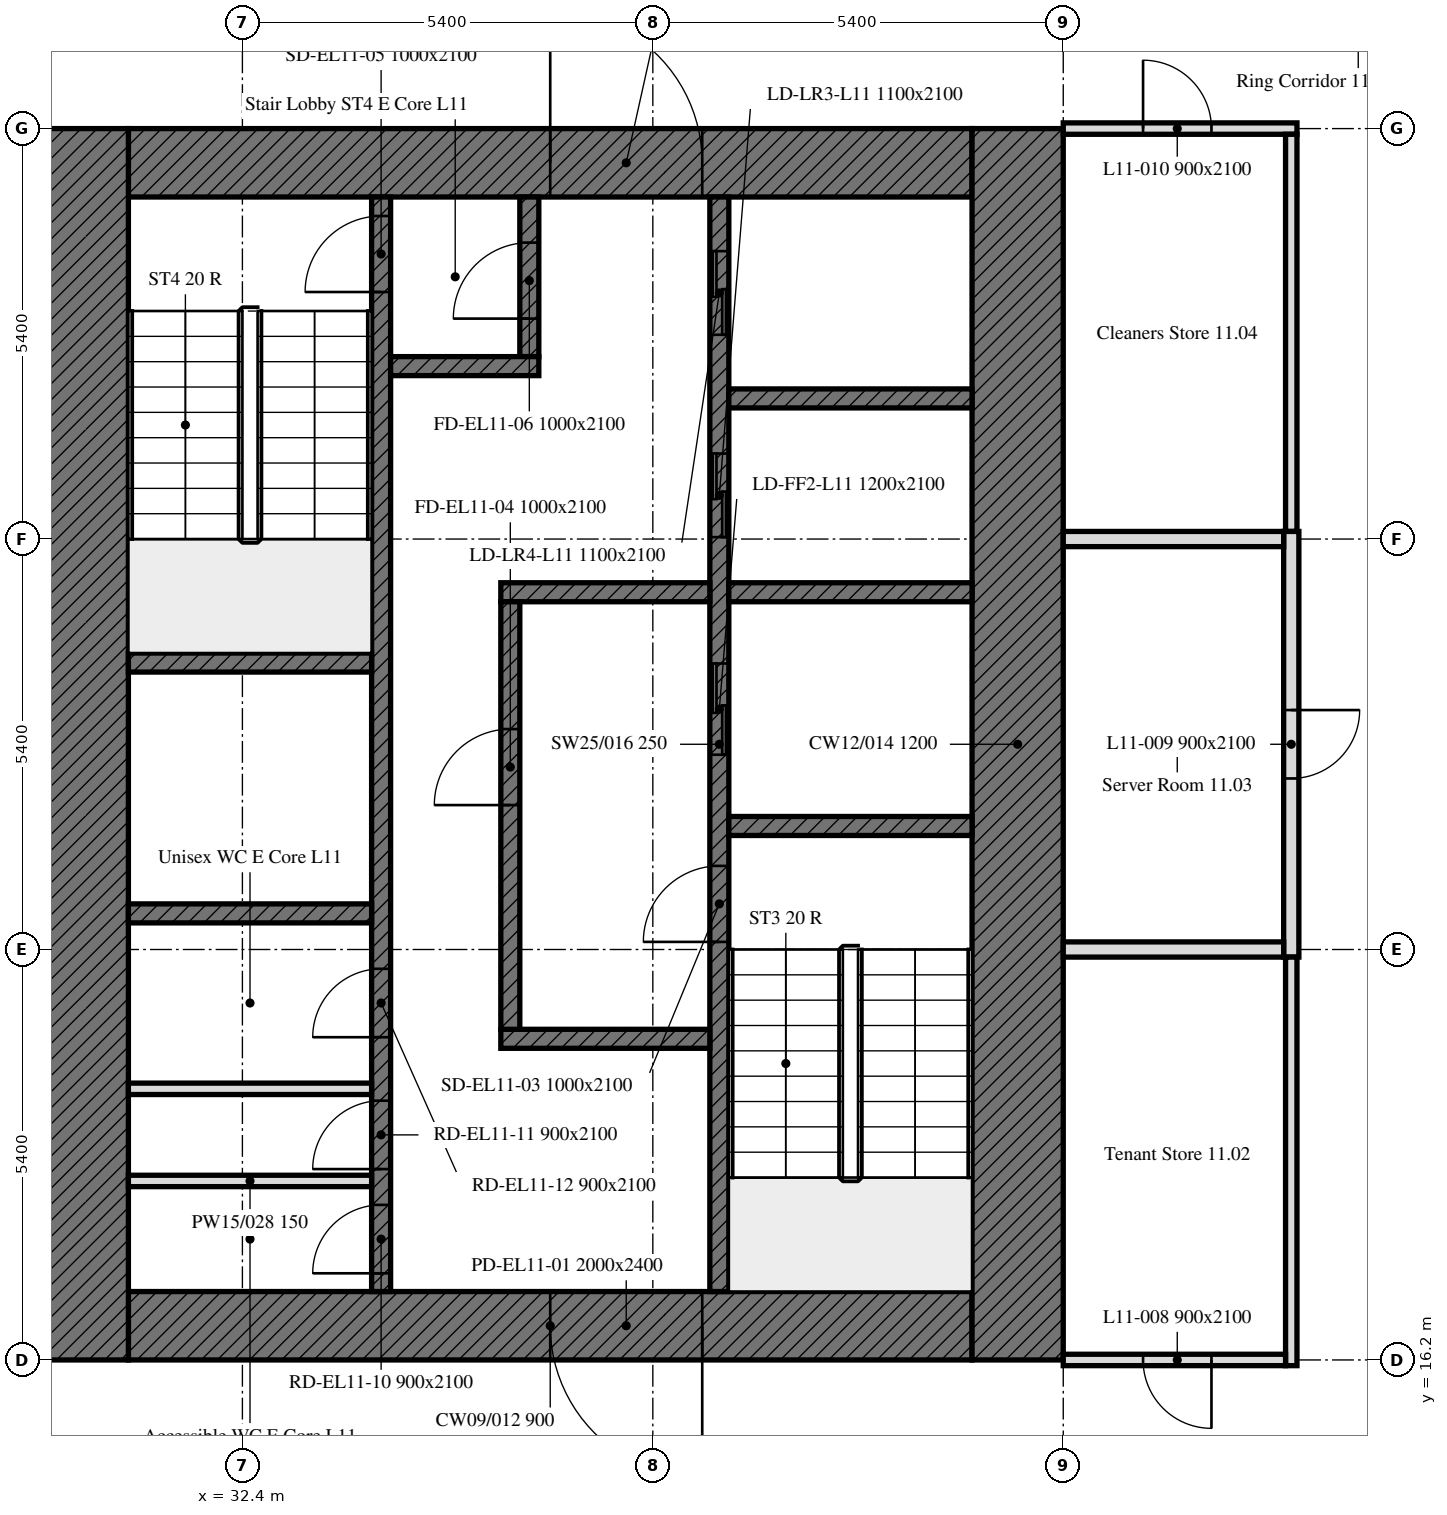
"""IFC4 building model, lengths in metres.
Left out: names, types, materials, properties, quantities, classifications, styles, units other than length and angle.
Written with IfcOpenShell. Run it as: python <this file> out.ifc"""

import sys

from ifc_helpers import new_model, si_unit, direction, frame, frame_2d, origin, place, context, subcontext, project, spatial, rectangle, extrude, element, fill, save


model = new_model("IFC4")
c1 = context("Model", 3, precision=1e-05, world=origin(), true_north=direction((0.0, 1.0)))
c2 = subcontext(c1, "Body", "Model", "MODEL_VIEW")
j1 = project(units=[si_unit("LENGTHUNIT", "METRE"), si_unit("PLANEANGLEUNIT", "RADIAN")], contexts=[c1])
p1 = place(None, origin())
s1 = spatial("IfcSite", under=j1, at=p1, CompositionType="ELEMENT")
p2 = place(p1, origin())
s2 = spatial("IfcBuilding", under=s1, at=p2, CompositionType="ELEMENT")
p3 = place(p2, frame((0.0, 0.0, 52.6)))
s3 = spatial("IfcBuildingStorey", under=s2, at=p3, CompositionType="ELEMENT", Elevation=52.6)
p4 = place(p3, frame((42.0, 16.65, 0.0), z_axis=(0.0, 0.0, 1.0), x_axis=(-1.0, 0.0, 0.0)))
e1 = element("IfcWall", 1, at=p4, inside=s3, PredefinedType="SOLIDWALL", context=c2, shape_type="SweptSolid", body=[
    extrude(rectangle(XDim=11.1, YDim=0.9, at=frame_2d((5.55, 0.0))), origin(), (0.0, 0.0, 1.0), 3.5),
])
p5 = place(p4, frame((3.55, 0.0, 0.0)))
e2 = element("IfcOpeningElement", 2, at=p5, cuts=e1, PredefinedType="OPENING", context=c2, shape_type="SweptSolid", body=[
    extrude(rectangle(XDim=2.0, YDim=2.4, at=frame_2d((1.0, 1.2))), frame((0.0, 0.45, 0.0), z_axis=(0.0, -1.0, 0.0), x_axis=(1.0, 0.0, 0.0)), (0.0, 0.0, 1.0), 0.9),
])
p6 = place(p3, frame((30.9, 31.95, 0.0), z_axis=(0.0, 0.0, 1.0), x_axis=(1.0, 0.0, 0.0)))
e3 = element("IfcWall", 3, at=p6, inside=s3, PredefinedType="SOLIDWALL", context=c2, shape_type="SweptSolid", body=[
    extrude(rectangle(XDim=11.1, YDim=0.9, at=frame_2d((5.55, 0.0))), origin(), (0.0, 0.0, 1.0), 3.5),
])
p7 = place(p6, frame((5.55, 0.0, 0.0)))
e4 = element("IfcOpeningElement", 4, at=p7, cuts=e3, PredefinedType="OPENING", context=c2, shape_type="SweptSolid", body=[
    extrude(rectangle(XDim=2.0, YDim=2.4, at=frame_2d((1.0, 1.2))), frame((0.0, 0.45, 0.0), z_axis=(0.0, -1.0, 0.0), x_axis=(1.0, 0.0, 0.0)), (0.0, 0.0, 1.0), 0.9),
])
for number, where, z_axis, x_axis in (
    (5, (42.6, 32.4, 0.0), (0.0, 0.0, 1.0), (0.0, -1.0, 0.0)),
    (6, (30.3, 16.2, 0.0), (0.0, 0.0, 1.0), (0.0, 1.0, 0.0)),
):
    element("IfcWall", number, at=place(p3, frame(where, z_axis=z_axis, x_axis=x_axis)), inside=s3, PredefinedType="SOLIDWALL", context=c2, shape_type="SweptSolid", body=[
        extrude(rectangle(XDim=16.2, YDim=1.2, at=frame_2d((8.1, 0.0))), origin(), (0.0, 0.0, 1.0), 3.5),
    ])
p8 = place(p3, frame((38.675, 17.1, 0.0), z_axis=(0.0, 0.0, 1.0), x_axis=(0.0, 1.0, 0.0)))
e7 = element("IfcWall", 7, at=p8, inside=s3, PredefinedType="SOLIDWALL", context=c2, shape_type="SweptSolid", body=[
    extrude(rectangle(XDim=14.4, YDim=0.25, at=frame_2d((7.2, 0.0))), origin(), (0.0, 0.0, 1.0), 3.5),
])
p9 = place(p8, frame((4.6, 0.0, 0.0)))
e8 = element("IfcOpeningElement", 8, at=p9, cuts=e7, PredefinedType="OPENING", context=c2, shape_type="SweptSolid", body=[
    extrude(rectangle(XDim=1.0, YDim=2.1, at=frame_2d((0.5, 1.05))), frame((0.0, 0.125, 0.0), z_axis=(0.0, -1.0, 0.0), x_axis=(1.0, 0.0, 0.0)), (0.0, 0.0, 1.0), 0.25),
])
p10 = place(p8, frame((7.062, 0.0, 0.0)))
e9 = element("IfcOpeningElement", 9, at=p10, cuts=e7, PredefinedType="OPENING", context=c2, shape_type="SweptSolid", body=[
    extrude(rectangle(XDim=1.2, YDim=2.1, at=frame_2d((0.6, 1.05))), frame((0.0, 0.125, 0.0), z_axis=(0.0, -1.0, 0.0), x_axis=(1.0, 0.0, 0.0)), (0.0, 0.0, 1.0), 0.25),
])
p11 = place(p8, frame((9.925, 0.0, 0.0)))
e10 = element("IfcOpeningElement", 10, at=p11, cuts=e7, PredefinedType="OPENING", context=c2, shape_type="SweptSolid", body=[
    extrude(rectangle(XDim=1.1, YDim=2.1, at=frame_2d((0.55, 1.05))), frame((0.0, 0.125, 0.0), z_axis=(0.0, -1.0, 0.0), x_axis=(1.0, 0.0, 0.0)), (0.0, 0.0, 1.0), 0.25),
])
p12 = place(p8, frame((12.587, 0.0, 0.0)))
e11 = element("IfcOpeningElement", 11, at=p12, cuts=e7, PredefinedType="OPENING", context=c2, shape_type="SweptSolid", body=[
    extrude(rectangle(XDim=1.1, YDim=2.1, at=frame_2d((0.55, 1.05))), frame((0.0, 0.125, 0.0), z_axis=(0.0, -1.0, 0.0), x_axis=(1.0, 0.0, 0.0)), (0.0, 0.0, 1.0), 0.25),
])
p13 = place(p3, frame((34.225, 17.1, 0.0), z_axis=(0.0, 0.0, 1.0), x_axis=(0.0, 1.0, 0.0)))
e12 = element("IfcWall", 12, at=p13, inside=s3, PredefinedType="SOLIDWALL", context=c2, shape_type="SweptSolid", body=[
    extrude(rectangle(XDim=14.4, YDim=0.25, at=frame_2d((7.2, 0.0))), origin(), (0.0, 0.0, 1.0), 3.5),
])
p14 = place(p13, frame((13.15, 0.0, 0.0)))
e13 = element("IfcOpeningElement", 13, at=p14, cuts=e12, PredefinedType="OPENING", context=c2, shape_type="SweptSolid", body=[
    extrude(rectangle(XDim=1.0, YDim=2.1, at=frame_2d((0.5, 1.05))), frame((0.0, 0.125, 0.0), z_axis=(0.0, -1.0, 0.0), x_axis=(1.0, 0.0, 0.0)), (0.0, 0.0, 1.0), 0.25),
])
p15 = place(p13, frame((0.24, 0.0, 0.0)))
e14 = element("IfcOpeningElement", 14, at=p15, cuts=e12, PredefinedType="OPENING", context=c2, shape_type="SweptSolid", body=[
    extrude(rectangle(XDim=0.9, YDim=2.1, at=frame_2d((0.45, 1.05))), frame((0.0, 0.125, 0.0), z_axis=(0.0, -1.0, 0.0), x_axis=(1.0, 0.0, 0.0)), (0.0, 0.0, 1.0), 0.25),
])
p16 = place(p13, frame((1.611, 0.0, 0.0)))
e15 = element("IfcOpeningElement", 15, at=p16, cuts=e12, PredefinedType="OPENING", context=c2, shape_type="SweptSolid", body=[
    extrude(rectangle(XDim=0.9, YDim=2.1, at=frame_2d((0.45, 1.05))), frame((0.0, 0.125, 0.0), z_axis=(0.0, -1.0, 0.0), x_axis=(1.0, 0.0, 0.0)), (0.0, 0.0, 1.0), 0.25),
])
p17 = place(p13, frame((3.346, 0.0, 0.0)))
e16 = element("IfcOpeningElement", 16, at=p17, cuts=e12, PredefinedType="OPENING", context=c2, shape_type="SweptSolid", body=[
    extrude(rectangle(XDim=0.9, YDim=2.1, at=frame_2d((0.45, 1.05))), frame((0.0, 0.125, 0.0), z_axis=(0.0, -1.0, 0.0), x_axis=(1.0, 0.0, 0.0)), (0.0, 0.0, 1.0), 0.25),
])
p18 = place(p3, frame((38.8, 23.225, 0.0), z_axis=(0.0, 0.0, 1.0), x_axis=(1.0, 0.0, 0.0)))
e17 = element("IfcWall", 17, at=p18, inside=s3, PredefinedType="SOLIDWALL", context=c2, shape_type="SweptSolid", body=[
    extrude(rectangle(XDim=3.2, YDim=0.25, at=frame_2d((1.6, 0.0))), origin(), (0.0, 0.0, 1.0), 3.5),
])
for number, where, z_axis, x_axis in (
    (18, (30.9, 25.375, 0.0), (0.0, 0.0, 1.0), (1.0, 0.0, 0.0)),
    (19, (30.9, 22.075, 0.0), (0.0, 0.0, 1.0), (1.0, 0.0, 0.0)),
):
    element("IfcWall", number, at=place(p3, frame(where, z_axis=z_axis, x_axis=x_axis)), inside=s3, PredefinedType="SOLIDWALL", context=c2, shape_type="SweptSolid", body=[
        extrude(rectangle(XDim=3.2, YDim=0.25, at=frame_2d((1.6, 0.0))), origin(), (0.0, 0.0, 1.0), 3.5),
    ])
p19 = place(p3, frame((38.8, 26.3, 0.0), z_axis=(0.0, 0.0, 1.0), x_axis=(1.0, 0.0, 0.0)))
e20 = element("IfcWall", 20, at=p19, inside=s3, PredefinedType="SOLIDWALL", context=c2, shape_type="SweptSolid", body=[
    extrude(rectangle(XDim=3.2, YDim=0.25, at=frame_2d((1.6, 0.0))), origin(), (0.0, 0.0, 1.0), 3.5),
])
for number, where, z_axis, x_axis in (
    (21, (35.8, 26.3, 0.0), (0.0, 0.0, 1.0), (1.0, 0.0, 0.0)),
    (22, (35.8, 20.425, 0.0), (0.0, 0.0, 1.0), (1.0, 0.0, 0.0)),
):
    element("IfcWall", number, at=place(p3, frame(where, z_axis=z_axis, x_axis=x_axis)), inside=s3, PredefinedType="SOLIDWALL", context=c2, shape_type="SweptSolid", body=[
        extrude(rectangle(XDim=2.75, YDim=0.25, at=frame_2d((1.375, 0.0))), origin(), (0.0, 0.0, 1.0), 3.5),
    ])
p20 = place(p3, frame((36.175, 29.4, 0.0), z_axis=(0.0, 0.0, 1.0), x_axis=(0.0, 1.0, 0.0)))
e23 = element("IfcWall", 23, at=p20, inside=s3, PredefinedType="SOLIDWALL", context=c2, shape_type="SweptSolid", body=[
    extrude(rectangle(XDim=2.1, YDim=0.25, at=frame_2d((1.05, 0.0))), origin(), (0.0, 0.0, 1.0), 3.5),
])
p21 = place(p20, frame((0.5, 0.0, 0.0)))
e24 = element("IfcOpeningElement", 24, at=p21, cuts=e23, PredefinedType="OPENING", context=c2, shape_type="SweptSolid", body=[
    extrude(rectangle(XDim=1.0, YDim=2.1, at=frame_2d((0.5, 1.05))), frame((0.0, 0.125, 0.0), z_axis=(0.0, -1.0, 0.0), x_axis=(1.0, 0.0, 0.0)), (0.0, 0.0, 1.0), 0.25),
])
p22 = place(p3, frame((34.35, 29.275, 0.0), z_axis=(0.0, 0.0, 1.0), x_axis=(1.0, 0.0, 0.0)))
e25 = element("IfcWall", 25, at=p22, inside=s3, PredefinedType="SOLIDWALL", context=c2, shape_type="SweptSolid", body=[
    extrude(rectangle(XDim=1.95, YDim=0.25, at=frame_2d((0.975, 0.0))), origin(), (0.0, 0.0, 1.0), 3.5),
])
p23 = place(p3, frame((35.925, 20.55, 0.0), z_axis=(0.0, 0.0, 1.0), x_axis=(0.0, 1.0, 0.0)))
e26 = element("IfcWall", 26, at=p23, inside=s3, PredefinedType="SOLIDWALL", context=c2, shape_type="SweptSolid", body=[
    extrude(rectangle(XDim=5.625, YDim=0.25, at=frame_2d((2.812, 0.0))), origin(), (0.0, 0.0, 1.0), 3.5),
])
p24 = place(p23, frame((2.95, 0.0, 0.0)))
e27 = element("IfcOpeningElement", 27, at=p24, cuts=e26, PredefinedType="OPENING", context=c2, shape_type="SweptSolid", body=[
    extrude(rectangle(XDim=1.0, YDim=2.1, at=frame_2d((0.5, 1.05))), frame((0.0, 0.125, 0.0), z_axis=(0.0, -1.0, 0.0), x_axis=(1.0, 0.0, 0.0)), (0.0, 0.0, 1.0), 0.25),
])
p25 = place(p3, frame((38.8, 28.85, 0.0), z_axis=(0.0, 0.0, 1.0), x_axis=(1.0, 0.0, 0.0)))
e28 = element("IfcWall", 28, at=p25, inside=s3, PredefinedType="SOLIDWALL", context=c2, shape_type="SweptSolid", body=[
    extrude(rectangle(XDim=3.2, YDim=0.25, at=frame_2d((1.6, 0.0))), origin(), (0.0, 0.0, 1.0), 3.5),
])
for number, where, z_axis, x_axis in (
    (29, (30.9, 18.555, 0.0), (0.0, 0.0, 1.0), (1.0, 0.0, 0.0)),
    (30, (30.9, 19.767, 0.0), (0.0, 0.0, 1.0), (1.0, 0.0, 0.0)),
):
    element("IfcWall", number, at=place(p3, frame(where, z_axis=z_axis, x_axis=x_axis)), inside=s3, PredefinedType="PARTITIONING", context=c2, shape_type="SweptSolid", body=[
        extrude(rectangle(XDim=3.2, YDim=0.15, at=frame_2d((1.6, 0.0))), origin(), (0.0, 0.0, 1.0), 3.5),
    ])
p26 = place(p3, frame((43.2, 32.4, 0.0), z_axis=(0.0, 0.0, 1.0), x_axis=(1.0, 0.0, 0.0)))
e31 = element("IfcWall", 31, at=p26, inside=s3, PredefinedType="PARTITIONING", context=c2, shape_type="SweptSolid", body=[
    extrude(rectangle(XDim=3.075, YDim=0.15, at=frame_2d((1.538, 0.0))), origin(), (0.0, 0.0, 1.0), 2.75),
])
p27 = place(p26, frame((1.05, 0.0, 0.0)))
e32 = element("IfcOpeningElement", 32, at=p27, cuts=e31, PredefinedType="OPENING", context=c2, shape_type="SweptSolid", body=[
    extrude(rectangle(XDim=0.9, YDim=2.1, at=frame_2d((0.45, 1.05))), frame((0.0, 0.075, 0.0), z_axis=(0.0, -1.0, 0.0), x_axis=(1.0, 0.0, 0.0)), (0.0, 0.0, 1.0), 0.15),
])
p28 = place(p3, frame((46.2, 32.325, 0.0), z_axis=(0.0, 0.0, 1.0), x_axis=(0.0, -1.0, 0.0)))
e33 = element("IfcWall", 33, at=p28, inside=s3, PredefinedType="PARTITIONING", context=c2, shape_type="SweptSolid", body=[
    extrude(rectangle(XDim=5.225, YDim=0.15, at=frame_2d((2.612, 0.0))), origin(), (0.0, 0.0, 1.0), 3.5),
])
p29 = place(p3, frame((46.2, 27.1, 0.0), z_axis=(0.0, 0.0, 1.0), x_axis=(0.0, -1.0, 0.0)))
e34 = element("IfcWall", 34, at=p29, inside=s3, PredefinedType="PARTITIONING", context=c2, shape_type="SweptSolid", body=[
    extrude(rectangle(XDim=5.6, YDim=0.2, at=frame_2d((2.8, 0.0))), origin(), (0.0, 0.0, 1.0), 3.5),
])
p30 = place(p29, frame((2.35, 0.0, 0.0)))
e35 = element("IfcOpeningElement", 35, at=p30, cuts=e34, PredefinedType="OPENING", context=c2, shape_type="SweptSolid", body=[
    extrude(rectangle(XDim=0.9, YDim=2.1, at=frame_2d((0.45, 1.05))), frame((0.0, 0.1, 0.0), z_axis=(0.0, -1.0, 0.0), x_axis=(1.0, 0.0, 0.0)), (0.0, 0.0, 1.0), 0.2),
])
p31 = place(p3, frame((46.2, 21.5, 0.0), z_axis=(0.0, 0.0, 1.0), x_axis=(0.0, -1.0, 0.0)))
e36 = element("IfcWall", 36, at=p31, inside=s3, PredefinedType="PARTITIONING", context=c2, shape_type="SweptSolid", body=[
    extrude(rectangle(XDim=5.375, YDim=0.15, at=frame_2d((2.688, 0.0))), origin(), (0.0, 0.0, 1.0), 3.5),
])
p32 = place(p3, frame((46.125, 16.2, 0.0), z_axis=(0.0, 0.0, 1.0), x_axis=(-1.0, 0.0, 0.0)))
e37 = element("IfcWall", 37, at=p32, inside=s3, PredefinedType="PARTITIONING", context=c2, shape_type="SweptSolid", body=[
    extrude(rectangle(XDim=2.925, YDim=0.15, at=frame_2d((1.462, 0.0))), origin(), (0.0, 0.0, 1.0), 2.75),
])
p33 = place(p32, frame((0.975, 0.0, 0.0)))
e38 = element("IfcOpeningElement", 38, at=p33, cuts=e37, PredefinedType="OPENING", context=c2, shape_type="SweptSolid", body=[
    extrude(rectangle(XDim=0.9, YDim=2.1, at=frame_2d((0.45, 1.05))), frame((0.0, 0.075, 0.0), z_axis=(0.0, -1.0, 0.0), x_axis=(1.0, 0.0, 0.0)), (0.0, 0.0, 1.0), 0.15),
])
for number, where, z_axis, x_axis in (
    (39, (46.1, 21.6, 0.0), (0.0, 0.0, 1.0), (-1.0, 0.0, 0.0)),
    (40, (46.1, 27.0, 0.0), (0.0, 0.0, 1.0), (-1.0, 0.0, 0.0)),
):
    element("IfcWall", number, at=place(p3, frame(where, z_axis=z_axis, x_axis=x_axis)), inside=s3, PredefinedType="PARTITIONING", context=c2, shape_type="SweptSolid", body=[
        extrude(rectangle(XDim=2.9, YDim=0.2, at=frame_2d((1.45, 0.0))), origin(), (0.0, 0.0, 1.0), 2.75),
    ])
p34 = place(p5, origin())
e41 = element("IfcDoor", 41, at=p34, inside=s3, OperationType="DOUBLE_DOOR_SINGLE_SWING", PredefinedType="DOOR", context=c2, shape_type="SweptSolid", body=[
    extrude(rectangle(XDim=2.0, YDim=2.4, at=frame_2d((1.0, 1.2))), frame((0.0, 0.025, 0.0), z_axis=(0.0, -1.0, 0.0), x_axis=(1.0, 0.0, 0.0)), (0.0, 0.0, 1.0), 0.05),
])
fill(e2, e41)
p35 = place(p7, origin())
e42 = element("IfcDoor", 42, at=p35, inside=s3, OperationType="DOUBLE_DOOR_SINGLE_SWING", PredefinedType="DOOR", context=c2, shape_type="SweptSolid", body=[
    extrude(rectangle(XDim=2.0, YDim=2.4, at=frame_2d((1.0, 1.2))), frame((0.0, 0.025, 0.0), z_axis=(0.0, -1.0, 0.0), x_axis=(1.0, 0.0, 0.0)), (0.0, 0.0, 1.0), 0.05),
])
fill(e4, e42)
p36 = place(p9, origin())
e43 = element("IfcDoor", 43, at=p36, inside=s3, OperationType="SINGLE_SWING_LEFT", PredefinedType="DOOR", context=c2, shape_type="SweptSolid", body=[
    extrude(rectangle(XDim=1.0, YDim=2.1, at=frame_2d((0.5, 1.05))), frame((0.0, 0.025, 0.0), z_axis=(0.0, -1.0, 0.0), x_axis=(1.0, 0.0, 0.0)), (0.0, 0.0, 1.0), 0.05),
])
fill(e8, e43)
p37 = place(p24, origin())
e44 = element("IfcDoor", 44, at=p37, inside=s3, OperationType="SINGLE_SWING_LEFT", PredefinedType="DOOR", context=c2, shape_type="SweptSolid", body=[
    extrude(rectangle(XDim=1.0, YDim=2.1, at=frame_2d((0.5, 1.05))), frame((0.0, 0.025, 0.0), z_axis=(0.0, -1.0, 0.0), x_axis=(1.0, 0.0, 0.0)), (0.0, 0.0, 1.0), 0.05),
])
fill(e27, e44)
p38 = place(p14, origin())
e45 = element("IfcDoor", 45, at=p38, inside=s3, OperationType="SINGLE_SWING_LEFT", PredefinedType="DOOR", context=c2, shape_type="SweptSolid", body=[
    extrude(rectangle(XDim=1.0, YDim=2.1, at=frame_2d((0.5, 1.05))), frame((0.0, 0.025, 0.0), z_axis=(0.0, -1.0, 0.0), x_axis=(1.0, 0.0, 0.0)), (0.0, 0.0, 1.0), 0.05),
])
fill(e13, e45)
p39 = place(p21, origin())
e46 = element("IfcDoor", 46, at=p39, inside=s3, OperationType="SINGLE_SWING_LEFT", PredefinedType="DOOR", context=c2, shape_type="SweptSolid", body=[
    extrude(rectangle(XDim=1.0, YDim=2.1, at=frame_2d((0.5, 1.05))), frame((0.0, 0.025, 0.0), z_axis=(0.0, -1.0, 0.0), x_axis=(1.0, 0.0, 0.0)), (0.0, 0.0, 1.0), 0.05),
])
fill(e24, e46)
p40 = place(p10, origin())
e47 = element("IfcDoor", 47, at=p40, inside=s3, OperationType="DOUBLE_DOOR_SLIDING", PredefinedType="DOOR", context=c2, shape_type="SweptSolid", body=[
    extrude(rectangle(XDim=1.2, YDim=2.1, at=frame_2d((0.6, 1.05))), frame((0.0, 0.025, 0.0), z_axis=(0.0, -1.0, 0.0), x_axis=(1.0, 0.0, 0.0)), (0.0, 0.0, 1.0), 0.05),
])
fill(e9, e47)
p41 = place(p11, origin())
e48 = element("IfcDoor", 48, at=p41, inside=s3, OperationType="DOUBLE_DOOR_SLIDING", PredefinedType="DOOR", context=c2, shape_type="SweptSolid", body=[
    extrude(rectangle(XDim=1.1, YDim=2.1, at=frame_2d((0.55, 1.05))), frame((0.0, 0.025, 0.0), z_axis=(0.0, -1.0, 0.0), x_axis=(1.0, 0.0, 0.0)), (0.0, 0.0, 1.0), 0.05),
])
fill(e10, e48)
p42 = place(p12, origin())
e49 = element("IfcDoor", 49, at=p42, inside=s3, OperationType="DOUBLE_DOOR_SLIDING", PredefinedType="DOOR", context=c2, shape_type="SweptSolid", body=[
    extrude(rectangle(XDim=1.1, YDim=2.1, at=frame_2d((0.55, 1.05))), frame((0.0, 0.025, 0.0), z_axis=(0.0, -1.0, 0.0), x_axis=(1.0, 0.0, 0.0)), (0.0, 0.0, 1.0), 0.05),
])
fill(e11, e49)
p43 = place(p15, origin())
e50 = element("IfcDoor", 50, at=p43, inside=s3, OperationType="SINGLE_SWING_LEFT", PredefinedType="DOOR", context=c2, shape_type="SweptSolid", body=[
    extrude(rectangle(XDim=0.9, YDim=2.1, at=frame_2d((0.45, 1.05))), frame((0.0, 0.025, 0.0), z_axis=(0.0, -1.0, 0.0), x_axis=(1.0, 0.0, 0.0)), (0.0, 0.0, 1.0), 0.05),
])
fill(e14, e50)
p44 = place(p16, origin())
e51 = element("IfcDoor", 51, at=p44, inside=s3, OperationType="SINGLE_SWING_LEFT", PredefinedType="DOOR", context=c2, shape_type="SweptSolid", body=[
    extrude(rectangle(XDim=0.9, YDim=2.1, at=frame_2d((0.45, 1.05))), frame((0.0, 0.025, 0.0), z_axis=(0.0, -1.0, 0.0), x_axis=(1.0, 0.0, 0.0)), (0.0, 0.0, 1.0), 0.05),
])
fill(e15, e51)
p45 = place(p17, origin())
e52 = element("IfcDoor", 52, at=p45, inside=s3, OperationType="SINGLE_SWING_LEFT", PredefinedType="DOOR", context=c2, shape_type="SweptSolid", body=[
    extrude(rectangle(XDim=0.9, YDim=2.1, at=frame_2d((0.45, 1.05))), frame((0.0, 0.025, 0.0), z_axis=(0.0, -1.0, 0.0), x_axis=(1.0, 0.0, 0.0)), (0.0, 0.0, 1.0), 0.05),
])
fill(e16, e52)
p46 = place(p33, origin())
e53 = element("IfcDoor", 53, at=p46, inside=s3, OperationType="SINGLE_SWING_RIGHT", PredefinedType="DOOR", context=c2, shape_type="SweptSolid", body=[
    extrude(rectangle(XDim=0.9, YDim=2.1, at=frame_2d((0.45, 1.05))), frame((0.0, 0.025, 0.0), z_axis=(0.0, -1.0, 0.0), x_axis=(1.0, 0.0, 0.0)), (0.0, 0.0, 1.0), 0.05),
])
fill(e38, e53)
p47 = place(p30, origin())
e54 = element("IfcDoor", 54, at=p47, inside=s3, OperationType="SINGLE_SWING_RIGHT", PredefinedType="DOOR", context=c2, shape_type="SweptSolid", body=[
    extrude(rectangle(XDim=0.9, YDim=2.1, at=frame_2d((0.45, 1.05))), frame((0.0, 0.025, 0.0), z_axis=(0.0, -1.0, 0.0), x_axis=(1.0, 0.0, 0.0)), (0.0, 0.0, 1.0), 0.05),
])
fill(e35, e54)
p48 = place(p27, origin())
e55 = element("IfcDoor", 55, at=p48, inside=s3, OperationType="SINGLE_SWING_RIGHT", PredefinedType="DOOR", context=c2, shape_type="SweptSolid", body=[
    extrude(rectangle(XDim=0.9, YDim=2.1, at=frame_2d((0.45, 1.05))), frame((0.0, 0.025, 0.0), z_axis=(0.0, -1.0, 0.0), x_axis=(1.0, 0.0, 0.0)), (0.0, 0.0, 1.0), 0.05),
])
fill(e32, e55)
save(model, sys.argv[1])
